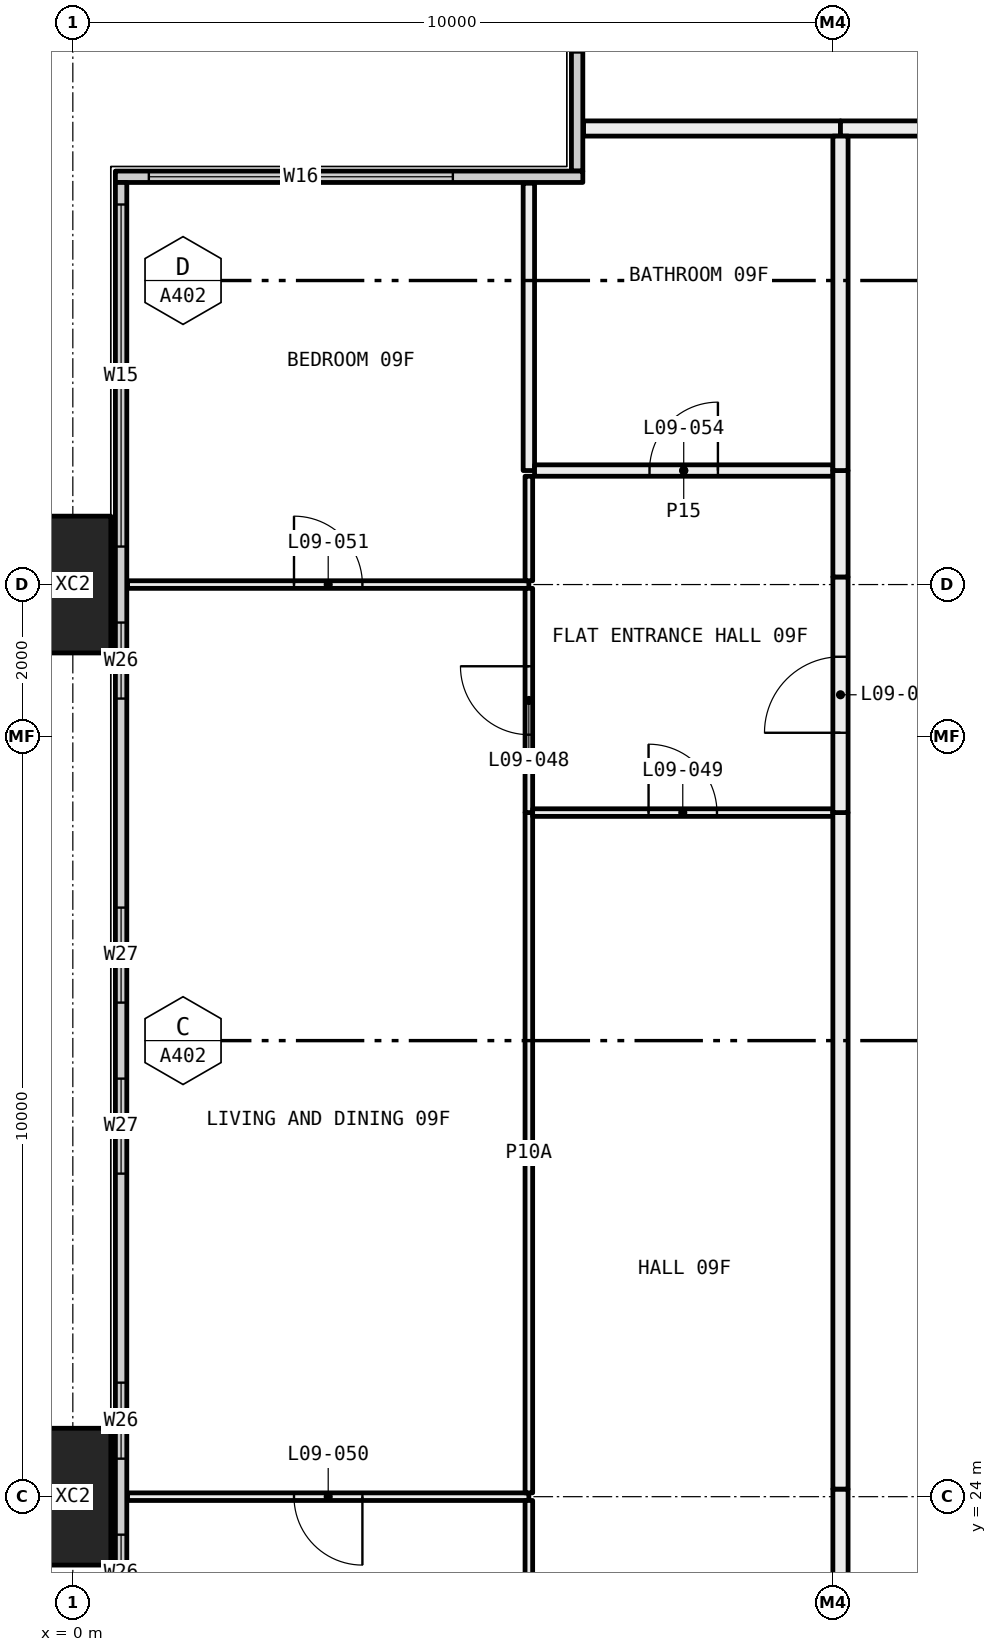
"""IFC4 building model, lengths in metres.
Left out: names, types, materials, properties, quantities, classifications, styles, units other than length and angle.
Written with IfcOpenShell. Run it as: python <this file> out.ifc"""

import sys

from ifc_helpers import new_model, si_unit, direction, frame, frame_2d, origin, origin_2d, place, context, subcontext, project, spatial, rectangle, hollow_rectangle, extrude, element, fill, save


model = new_model("IFC4")
c1 = context("Model", 3, precision=1e-05, world=origin(), true_north=direction((0.0, 1.0)))
c2 = subcontext(c1, "Body", "Model", "MODEL_VIEW")
j1 = project(units=[si_unit("LENGTHUNIT", "METRE"), si_unit("PLANEANGLEUNIT", "RADIAN")], contexts=[c1])
p1 = place(None, origin())
s1 = spatial("IfcSite", under=j1, at=p1, CompositionType="ELEMENT")
p2 = place(p1, origin())
s2 = spatial("IfcBuilding", under=s1, at=p2, CompositionType="ELEMENT")
p3 = place(p2, frame((0.0, 0.0, 43.8)))
s3 = spatial("IfcBuildingStorey", under=s2, at=p3, CompositionType="ELEMENT", Elevation=43.8)
for number, where, z_axis, x_axis in (
    (1, (0.0, 24.0, -0.4), (0.0, 0.0, 1.0), (0.0, 1.0, 0.0)),
    (2, (0.0, 36.0, -0.4), (0.0, 0.0, 1.0), (0.0, 1.0, 0.0)),
):
    element("IfcColumn", number, at=place(p3, frame(where, z_axis=z_axis, x_axis=x_axis)), inside=s3, PredefinedType="COLUMN", context=c2, shape_type="SweptSolid", body=[
        extrude(hollow_rectangle(XDim=1.8, YDim=1.0, WallThickness=0.07, at=origin_2d()), origin(), (0.0, 0.0, 1.0), 3.45),
    ])
p4 = place(p3, frame((6.635, 41.44, 0.0), z_axis=(0.0, 0.0, 1.0), x_axis=(0.0, 1.0, 0.0)))
e3 = element("IfcWall", 3, at=p4, inside=s3, PredefinedType="ELEMENTEDWALL", context=c2, shape_type="SweptSolid", body=[
    extrude(rectangle(XDim=5.85, YDim=0.15, at=frame_2d((2.925, 0.0))), origin(), (0.0, 0.0, 1.0), 3.05),
])
p5 = place(p4, frame((1.56, 0.0, 0.45)))
e4 = element("IfcOpeningElement", 4, at=p5, cuts=e3, PredefinedType="OPENING", context=c2, shape_type="SweptSolid", body=[
    extrude(rectangle(XDim=4.0, YDim=2.55, at=frame_2d((2.0, 1.275))), frame((0.0, 0.085, 0.0), z_axis=(0.0, -1.0, 0.0), x_axis=(1.0, 0.0, 0.0)), (0.0, 0.0, 1.0), 0.17),
])
p6 = place(p3, frame((0.56, 41.365, 0.0), z_axis=(0.0, 0.0, 1.0), x_axis=(1.0, 0.0, 0.0)))
e5 = element("IfcWall", 5, at=p6, inside=s3, PredefinedType="ELEMENTEDWALL", context=c2, shape_type="SweptSolid", body=[
    extrude(rectangle(XDim=6.15, YDim=0.15, at=frame_2d((3.075, 0.0))), origin(), (0.0, 0.0, 1.0), 3.05),
])
p7 = place(p6, frame((0.44, 0.0, 0.45)))
e6 = element("IfcOpeningElement", 6, at=p7, cuts=e5, PredefinedType="OPENING", context=c2, shape_type="SweptSolid", body=[
    extrude(rectangle(XDim=4.0, YDim=2.55, at=frame_2d((2.0, 1.275))), frame((0.0, 0.085, 0.0), z_axis=(0.0, -1.0, 0.0), x_axis=(1.0, 0.0, 0.0)), (0.0, 0.0, 1.0), 0.17),
])
p8 = place(p3, frame((0.635, 6.71, 0.0), z_axis=(0.0, 0.0, 1.0), x_axis=(0.0, 1.0, 0.0)))
e7 = element("IfcWall", 7, at=p8, inside=s3, PredefinedType="ELEMENTEDWALL", context=c2, shape_type="SweptSolid", body=[
    extrude(rectangle(XDim=34.58, YDim=0.15, at=frame_2d((17.29, 0.0))), origin(), (0.0, 0.0, 1.0), 3.05),
])
p9 = place(p8, frame((0.29, 0.0, 0.45)))
e8 = element("IfcOpeningElement", 8, at=p9, cuts=e7, PredefinedType="OPENING", context=c2, shape_type="SweptSolid", body=[
    extrude(rectangle(XDim=4.5, YDim=2.55, at=frame_2d((2.25, 1.275))), frame((0.0, 0.085, 0.0), z_axis=(0.0, -1.0, 0.0), x_axis=(1.0, 0.0, 0.0)), (0.0, 0.0, 1.0), 0.17),
])
p10 = place(p8, frame((5.79, 0.0, 0.45)))
e9 = element("IfcOpeningElement", 9, at=p10, cuts=e7, PredefinedType="OPENING", context=c2, shape_type="SweptSolid", body=[
    extrude(rectangle(XDim=1.0, YDim=2.55, at=frame_2d((0.5, 1.275))), frame((0.0, 0.085, 0.0), z_axis=(0.0, -1.0, 0.0), x_axis=(1.0, 0.0, 0.0)), (0.0, 0.0, 1.0), 0.17),
])
p11 = place(p8, frame((9.54, 0.0, 0.45)))
e10 = element("IfcOpeningElement", 10, at=p11, cuts=e7, PredefinedType="OPENING", context=c2, shape_type="SweptSolid", body=[
    extrude(rectangle(XDim=1.25, YDim=2.55, at=frame_2d((0.625, 1.275))), frame((0.0, 0.085, 0.0), z_axis=(0.0, -1.0, 0.0), x_axis=(1.0, 0.0, 0.0)), (0.0, 0.0, 1.0), 0.17),
])
p12 = place(p8, frame((11.79, 0.0, 0.45)))
e11 = element("IfcOpeningElement", 11, at=p12, cuts=e7, PredefinedType="OPENING", context=c2, shape_type="SweptSolid", body=[
    extrude(rectangle(XDim=1.25, YDim=2.55, at=frame_2d((0.625, 1.275))), frame((0.0, 0.085, 0.0), z_axis=(0.0, -1.0, 0.0), x_axis=(1.0, 0.0, 0.0)), (0.0, 0.0, 1.0), 0.17),
])
p13 = place(p8, frame((15.79, 0.0, 0.45)))
e12 = element("IfcOpeningElement", 12, at=p13, cuts=e7, PredefinedType="OPENING", context=c2, shape_type="SweptSolid", body=[
    extrude(rectangle(XDim=1.0, YDim=2.55, at=frame_2d((0.5, 1.275))), frame((0.0, 0.085, 0.0), z_axis=(0.0, -1.0, 0.0), x_axis=(1.0, 0.0, 0.0)), (0.0, 0.0, 1.0), 0.17),
])
p14 = place(p8, frame((17.79, 0.0, 0.45)))
e13 = element("IfcOpeningElement", 13, at=p14, cuts=e7, PredefinedType="OPENING", context=c2, shape_type="SweptSolid", body=[
    extrude(rectangle(XDim=1.0, YDim=2.55, at=frame_2d((0.5, 1.275))), frame((0.0, 0.085, 0.0), z_axis=(0.0, -1.0, 0.0), x_axis=(1.0, 0.0, 0.0)), (0.0, 0.0, 1.0), 0.17),
])
p15 = place(p8, frame((21.54, 0.0, 0.45)))
e14 = element("IfcOpeningElement", 14, at=p15, cuts=e7, PredefinedType="OPENING", context=c2, shape_type="SweptSolid", body=[
    extrude(rectangle(XDim=1.25, YDim=2.55, at=frame_2d((0.625, 1.275))), frame((0.0, 0.085, 0.0), z_axis=(0.0, -1.0, 0.0), x_axis=(1.0, 0.0, 0.0)), (0.0, 0.0, 1.0), 0.17),
])
p16 = place(p8, frame((23.79, 0.0, 0.45)))
e15 = element("IfcOpeningElement", 15, at=p16, cuts=e7, PredefinedType="OPENING", context=c2, shape_type="SweptSolid", body=[
    extrude(rectangle(XDim=1.25, YDim=2.55, at=frame_2d((0.625, 1.275))), frame((0.0, 0.085, 0.0), z_axis=(0.0, -1.0, 0.0), x_axis=(1.0, 0.0, 0.0)), (0.0, 0.0, 1.0), 0.17),
])
p17 = place(p8, frame((27.79, 0.0, 0.45)))
e16 = element("IfcOpeningElement", 16, at=p17, cuts=e7, PredefinedType="OPENING", context=c2, shape_type="SweptSolid", body=[
    extrude(rectangle(XDim=1.0, YDim=2.55, at=frame_2d((0.5, 1.275))), frame((0.0, 0.085, 0.0), z_axis=(0.0, -1.0, 0.0), x_axis=(1.0, 0.0, 0.0)), (0.0, 0.0, 1.0), 0.17),
])
p18 = place(p8, frame((29.79, 0.0, 0.45)))
e17 = element("IfcOpeningElement", 17, at=p18, cuts=e7, PredefinedType="OPENING", context=c2, shape_type="SweptSolid", body=[
    extrude(rectangle(XDim=4.5, YDim=2.55, at=frame_2d((2.25, 1.275))), frame((0.0, 0.085, 0.0), z_axis=(0.0, -1.0, 0.0), x_axis=(1.0, 0.0, 0.0)), (0.0, 0.0, 1.0), 0.17),
])
p19 = place(p3, frame((6.72, 42.0, 0.0), z_axis=(0.0, 0.0, 1.0), x_axis=(1.0, 0.0, 0.0)))
e18 = element("IfcWall", 18, at=p19, inside=s3, PredefinedType="PARTITIONING", context=c2, shape_type="SweptSolid", body=[
    extrude(rectangle(XDim=3.38, YDim=0.2, at=frame_2d((1.69, 0.0))), origin(), (0.0, 0.0, 1.0), 3.05),
])
p20 = place(p3, frame((10.1, 42.0, 0.0), z_axis=(0.0, 0.0, 1.0), x_axis=(1.0, 0.0, 0.0)))
e19 = element("IfcWall", 19, at=p20, inside=s3, PredefinedType="PARTITIONING", context=c2, shape_type="SweptSolid", body=[
    extrude(rectangle(XDim=1.9, YDim=0.2, at=frame_2d((0.95, 0.0))), origin(), (0.0, 0.0, 1.0), 3.05),
])
p21 = place(p3, frame((6.0, 24.0, 0.0), z_axis=(0.0, 0.0, 1.0), x_axis=(-1.0, 0.0, 0.0)))
e20 = element("IfcWall", 20, at=p21, inside=s3, PredefinedType="PARTITIONING", context=c2, shape_type="SweptSolid", body=[
    extrude(rectangle(XDim=5.28, YDim=0.1, at=frame_2d((2.64, 0.0))), origin(), (0.0, 0.0, 1.0), 2.45),
])
p22 = place(p21, frame((2.19, 0.0, 0.0)))
e21 = element("IfcOpeningElement", 21, at=p22, cuts=e20, PredefinedType="OPENING", context=c2, shape_type="SweptSolid", body=[
    extrude(rectangle(XDim=0.9, YDim=2.1, at=frame_2d((0.45, 1.05))), frame((0.0, 0.06, 0.0), z_axis=(0.0, -1.0, 0.0), x_axis=(1.0, 0.0, 0.0)), (0.0, 0.0, 1.0), 0.12),
])
p23 = place(p3, frame((6.0, 21.075, 0.0), z_axis=(0.0, 0.0, 1.0), x_axis=(0.0, 1.0, 0.0)))
e22 = element("IfcWall", 22, at=p23, inside=s3, PredefinedType="PARTITIONING", context=c2, shape_type="SweptSolid", body=[
    extrude(rectangle(XDim=2.875, YDim=0.1, at=frame_2d((1.438, 0.0))), origin(), (0.0, 0.0, 1.0), 2.45),
])
p24 = place(p3, frame((6.0, 36.0, 0.0), z_axis=(0.0, 0.0, 1.0), x_axis=(-1.0, 0.0, 0.0)))
e23 = element("IfcWall", 23, at=p24, inside=s3, PredefinedType="PARTITIONING", context=c2, shape_type="SweptSolid", body=[
    extrude(rectangle(XDim=5.28, YDim=0.1, at=frame_2d((2.64, 0.0))), origin(), (0.0, 0.0, 1.0), 2.45),
])
p25 = place(p24, frame((2.19, 0.0, 0.0)))
e24 = element("IfcOpeningElement", 24, at=p25, cuts=e23, PredefinedType="OPENING", context=c2, shape_type="SweptSolid", body=[
    extrude(rectangle(XDim=0.9, YDim=2.1, at=frame_2d((0.45, 1.05))), frame((0.0, 0.06, 0.0), z_axis=(0.0, -1.0, 0.0), x_axis=(1.0, 0.0, 0.0)), (0.0, 0.0, 1.0), 0.12),
])
p26 = place(p3, frame((6.0, 24.05, 0.0), z_axis=(0.0, 0.0, 1.0), x_axis=(0.0, 1.0, 0.0)))
e25 = element("IfcWall", 25, at=p26, inside=s3, PredefinedType="PARTITIONING", context=c2, shape_type="SweptSolid", body=[
    extrude(rectangle(XDim=8.95, YDim=0.1, at=frame_2d((4.475, 0.0))), origin(), (0.0, 0.0, 1.0), 2.45),
])
p27 = place(p3, frame((6.0, 33.0, 0.0), z_axis=(0.0, 0.0, 1.0), x_axis=(0.0, 1.0, 0.0)))
e26 = element("IfcWall", 26, at=p27, inside=s3, PredefinedType="PARTITIONING", context=c2, shape_type="SweptSolid", body=[
    extrude(rectangle(XDim=2.95, YDim=0.1, at=frame_2d((1.475, 0.0))), origin(), (0.0, 0.0, 1.0), 2.45),
])
p28 = place(p27, frame((1.025, 0.0, 0.0)))
e27 = element("IfcOpeningElement", 27, at=p28, cuts=e26, PredefinedType="OPENING", context=c2, shape_type="SweptSolid", body=[
    extrude(rectangle(XDim=0.9, YDim=2.1, at=frame_2d((0.45, 1.05))), frame((0.0, 0.06, 0.0), z_axis=(0.0, -1.0, 0.0), x_axis=(1.0, 0.0, 0.0)), (0.0, 0.0, 1.0), 0.12),
])
p29 = place(p3, frame((6.0, 36.05, 0.0), z_axis=(0.0, 0.0, 1.0), x_axis=(0.0, 1.0, 0.0)))
e28 = element("IfcWall", 28, at=p29, inside=s3, PredefinedType="PARTITIONING", context=c2, shape_type="SweptSolid", body=[
    extrude(rectangle(XDim=1.375, YDim=0.1, at=frame_2d((0.688, 0.0))), origin(), (0.0, 0.0, 1.0), 2.45),
])
p30 = place(p3, frame((6.0, 37.5, 0.0), z_axis=(0.0, 0.0, 1.0), x_axis=(0.0, 1.0, 0.0)))
e29 = element("IfcWall", 29, at=p30, inside=s3, PredefinedType="PARTITIONING", context=c2, shape_type="SweptSolid", body=[
    extrude(rectangle(XDim=3.78, YDim=0.15, at=frame_2d((1.89, 0.0))), origin(), (0.0, 0.0, 1.0), 3.05),
])
p31 = place(p3, frame((10.0, 33.0, 0.0), z_axis=(0.0, 0.0, 1.0), x_axis=(-1.0, 0.0, 0.0)))
e30 = element("IfcWall", 30, at=p31, inside=s3, PredefinedType="PARTITIONING", context=c2, shape_type="SweptSolid", body=[
    extrude(rectangle(XDim=3.95, YDim=0.1, at=frame_2d((1.975, 0.0))), origin(), (0.0, 0.0, 1.0), 3.05),
])
p32 = place(p31, frame((1.525, 0.0, 0.0)))
e31 = element("IfcOpeningElement", 31, at=p32, cuts=e30, PredefinedType="OPENING", context=c2, shape_type="SweptSolid", body=[
    extrude(rectangle(XDim=0.9, YDim=2.1, at=frame_2d((0.45, 1.05))), frame((0.0, 0.06, 0.0), z_axis=(0.0, -1.0, 0.0), x_axis=(1.0, 0.0, 0.0)), (0.0, 0.0, 1.0), 0.12),
])
p33 = place(p3, frame((10.1, 21.0, 0.0), z_axis=(0.0, 0.0, 1.0), x_axis=(0.0, 1.0, 0.0)))
e32 = element("IfcWall", 32, at=p33, inside=s3, PredefinedType="PARTITIONING", context=c2, shape_type="SweptSolid", body=[
    extrude(rectangle(XDim=3.1, YDim=0.2, at=frame_2d((1.55, 0.0))), origin(), (0.0, 0.0, 1.0), 2.45),
])
p34 = place(p3, frame((10.1, 24.1, 0.0), z_axis=(0.0, 0.0, 1.0), x_axis=(0.0, 1.0, 0.0)))
e33 = element("IfcWall", 33, at=p34, inside=s3, PredefinedType="PARTITIONING", context=c2, shape_type="SweptSolid", body=[
    extrude(rectangle(XDim=8.9, YDim=0.2, at=frame_2d((4.45, 0.0))), origin(), (0.0, 0.0, 1.0), 3.05),
])
p35 = place(p3, frame((10.0, 37.5, 0.0), z_axis=(0.0, 0.0, 1.0), x_axis=(-1.0, 0.0, 0.0)))
e34 = element("IfcWall", 34, at=p35, inside=s3, PredefinedType="PARTITIONING", context=c2, shape_type="SweptSolid", body=[
    extrude(rectangle(XDim=3.925, YDim=0.15, at=frame_2d((1.962, 0.0))), origin(), (0.0, 0.0, 1.0), 3.05),
])
p36 = place(p35, frame((1.512, 0.0, 0.0)))
e35 = element("IfcOpeningElement", 35, at=p36, cuts=e34, PredefinedType="OPENING", context=c2, shape_type="SweptSolid", body=[
    extrude(rectangle(XDim=0.9, YDim=2.1, at=frame_2d((0.45, 1.05))), frame((0.0, 0.085, 0.0), z_axis=(0.0, -1.0, 0.0), x_axis=(1.0, 0.0, 0.0)), (0.0, 0.0, 1.0), 0.17),
])
p37 = place(p3, frame((10.1, 33.0, 0.0), z_axis=(0.0, 0.0, 1.0), x_axis=(0.0, 1.0, 0.0)))
e36 = element("IfcWall", 36, at=p37, inside=s3, PredefinedType="PARTITIONING", context=c2, shape_type="SweptSolid", body=[
    extrude(rectangle(XDim=3.1, YDim=0.2, at=frame_2d((1.55, 0.0))), origin(), (0.0, 0.0, 1.0), 2.45),
])
p38 = place(p37, frame((1.05, 0.0, 0.0)))
e37 = element("IfcOpeningElement", 37, at=p38, cuts=e36, PredefinedType="OPENING", context=c2, shape_type="SweptSolid", body=[
    extrude(rectangle(XDim=1.0, YDim=2.1, at=frame_2d((0.5, 1.05))), frame((0.0, 0.11, 0.0), z_axis=(0.0, -1.0, 0.0), x_axis=(1.0, 0.0, 0.0)), (0.0, 0.0, 1.0), 0.22),
])
p39 = place(p3, frame((10.1, 36.1, 0.0), z_axis=(0.0, 0.0, 1.0), x_axis=(0.0, 1.0, 0.0)))
e38 = element("IfcWall", 38, at=p39, inside=s3, PredefinedType="PARTITIONING", context=c2, shape_type="SweptSolid", body=[
    extrude(rectangle(XDim=1.4, YDim=0.2, at=frame_2d((0.7, 0.0))), origin(), (0.0, 0.0, 1.0), 3.05),
])
p40 = place(p3, frame((10.1, 37.5, 0.0), z_axis=(0.0, 0.0, 1.0), x_axis=(0.0, 1.0, 0.0)))
e39 = element("IfcWall", 39, at=p40, inside=s3, PredefinedType="PARTITIONING", context=c2, shape_type="SweptSolid", body=[
    extrude(rectangle(XDim=4.4, YDim=0.2, at=frame_2d((2.2, 0.0))), origin(), (0.0, 0.0, 1.0), 3.05),
])
p41 = place(p7, origin())
e40 = element("IfcWindow", 40, at=p41, inside=s3, PartitioningType="SINGLE_PANEL", PredefinedType="WINDOW", context=c2, shape_type="SweptSolid", body=[
    extrude(rectangle(XDim=4.0, YDim=2.55, at=frame_2d((2.0, 1.275))), frame((0.0, 0.03, 0.0), z_axis=(0.0, -1.0, 0.0), x_axis=(1.0, 0.0, 0.0)), (0.0, 0.0, 1.0), 0.06),
])
fill(e6, e40)
p42 = place(p13, origin())
e41 = element("IfcWindow", 41, at=p42, inside=s3, PartitioningType="SINGLE_PANEL", PredefinedType="WINDOW", context=c2, shape_type="SweptSolid", body=[
    extrude(rectangle(XDim=1.0, YDim=2.55, at=frame_2d((0.5, 1.275))), frame((0.0, 0.03, 0.0), z_axis=(0.0, -1.0, 0.0), x_axis=(1.0, 0.0, 0.0)), (0.0, 0.0, 1.0), 0.06),
])
fill(e12, e41)
p43 = place(p14, origin())
e42 = element("IfcWindow", 42, at=p43, inside=s3, PartitioningType="SINGLE_PANEL", PredefinedType="WINDOW", context=c2, shape_type="SweptSolid", body=[
    extrude(rectangle(XDim=1.0, YDim=2.55, at=frame_2d((0.5, 1.275))), frame((0.0, 0.03, 0.0), z_axis=(0.0, -1.0, 0.0), x_axis=(1.0, 0.0, 0.0)), (0.0, 0.0, 1.0), 0.06),
])
fill(e13, e42)
p44 = place(p15, origin())
e43 = element("IfcWindow", 43, at=p44, inside=s3, PartitioningType="SINGLE_PANEL", PredefinedType="WINDOW", context=c2, shape_type="SweptSolid", body=[
    extrude(rectangle(XDim=1.25, YDim=2.55, at=frame_2d((0.625, 1.275))), frame((0.0, 0.03, 0.0), z_axis=(0.0, -1.0, 0.0), x_axis=(1.0, 0.0, 0.0)), (0.0, 0.0, 1.0), 0.06),
])
fill(e14, e43)
p45 = place(p16, origin())
e44 = element("IfcWindow", 44, at=p45, inside=s3, PartitioningType="SINGLE_PANEL", PredefinedType="WINDOW", context=c2, shape_type="SweptSolid", body=[
    extrude(rectangle(XDim=1.25, YDim=2.55, at=frame_2d((0.625, 1.275))), frame((0.0, 0.03, 0.0), z_axis=(0.0, -1.0, 0.0), x_axis=(1.0, 0.0, 0.0)), (0.0, 0.0, 1.0), 0.06),
])
fill(e15, e44)
p46 = place(p17, origin())
e45 = element("IfcWindow", 45, at=p46, inside=s3, PartitioningType="SINGLE_PANEL", PredefinedType="WINDOW", context=c2, shape_type="SweptSolid", body=[
    extrude(rectangle(XDim=1.0, YDim=2.55, at=frame_2d((0.5, 1.275))), frame((0.0, 0.03, 0.0), z_axis=(0.0, -1.0, 0.0), x_axis=(1.0, 0.0, 0.0)), (0.0, 0.0, 1.0), 0.06),
])
fill(e16, e45)
p47 = place(p18, origin())
e46 = element("IfcWindow", 46, at=p47, inside=s3, PartitioningType="SINGLE_PANEL", PredefinedType="WINDOW", context=c2, shape_type="SweptSolid", body=[
    extrude(rectangle(XDim=4.5, YDim=2.55, at=frame_2d((2.25, 1.275))), frame((0.0, 0.03, 0.0), z_axis=(0.0, -1.0, 0.0), x_axis=(1.0, 0.0, 0.0)), (0.0, 0.0, 1.0), 0.06),
])
fill(e17, e46)
p48 = place(p38, origin())
e47 = element("IfcDoor", 47, at=p48, inside=s3, OperationType="SINGLE_SWING_RIGHT", PredefinedType="DOOR", context=c2, shape_type="SweptSolid", body=[
    extrude(rectangle(XDim=1.0, YDim=2.1, at=frame_2d((0.5, 1.05))), frame((0.0, 0.025, 0.0), z_axis=(0.0, -1.0, 0.0), x_axis=(1.0, 0.0, 0.0)), (0.0, 0.0, 1.0), 0.05),
])
fill(e37, e47)
p49 = place(p28, origin())
e48 = element("IfcDoor", 48, at=p49, inside=s3, OperationType="SINGLE_SWING_LEFT", PredefinedType="DOOR", context=c2, shape_type="SweptSolid", body=[
    extrude(rectangle(XDim=0.9, YDim=2.1, at=frame_2d((0.45, 1.05))), frame((0.0, 0.025, 0.0), z_axis=(0.0, -1.0, 0.0), x_axis=(1.0, 0.0, 0.0)), (0.0, 0.0, 1.0), 0.05),
])
fill(e27, e48)
p50 = place(p32, frame((0.9, 0.0, 0.0), x_axis=(-1.0, 0.0, 0.0)))
e49 = element("IfcDoor", 49, at=p50, inside=s3, OperationType="SINGLE_SWING_RIGHT", PredefinedType="DOOR", context=c2, shape_type="SweptSolid", body=[
    extrude(rectangle(XDim=0.9, YDim=2.1, at=frame_2d((0.45, 1.05))), frame((0.0, 0.025, 0.0), z_axis=(0.0, -1.0, 0.0), x_axis=(1.0, 0.0, 0.0)), (0.0, 0.0, 1.0), 0.05),
])
fill(e31, e49)
p51 = place(p22, origin())
e50 = element("IfcDoor", 50, at=p51, inside=s3, OperationType="SINGLE_SWING_RIGHT", PredefinedType="DOOR", context=c2, shape_type="SweptSolid", body=[
    extrude(rectangle(XDim=0.9, YDim=2.1, at=frame_2d((0.45, 1.05))), frame((0.0, 0.025, 0.0), z_axis=(0.0, -1.0, 0.0), x_axis=(1.0, 0.0, 0.0)), (0.0, 0.0, 1.0), 0.05),
])
fill(e21, e50)
p52 = place(p25, frame((0.9, 0.0, 0.0), x_axis=(-1.0, 0.0, 0.0)))
e51 = element("IfcDoor", 51, at=p52, inside=s3, OperationType="SINGLE_SWING_RIGHT", PredefinedType="DOOR", context=c2, shape_type="SweptSolid", body=[
    extrude(rectangle(XDim=0.9, YDim=2.1, at=frame_2d((0.45, 1.05))), frame((0.0, 0.025, 0.0), z_axis=(0.0, -1.0, 0.0), x_axis=(1.0, 0.0, 0.0)), (0.0, 0.0, 1.0), 0.05),
])
fill(e24, e51)
p53 = place(p36, frame((0.9, 0.0, 0.0), x_axis=(-1.0, 0.0, 0.0)))
e52 = element("IfcDoor", 52, at=p53, inside=s3, OperationType="SINGLE_SWING_LEFT", PredefinedType="DOOR", context=c2, shape_type="SweptSolid", body=[
    extrude(rectangle(XDim=0.9, YDim=2.1, at=frame_2d((0.45, 1.05))), frame((0.0, 0.025, 0.0), z_axis=(0.0, -1.0, 0.0), x_axis=(1.0, 0.0, 0.0)), (0.0, 0.0, 1.0), 0.05),
])
fill(e35, e52)
save(model, sys.argv[1])
